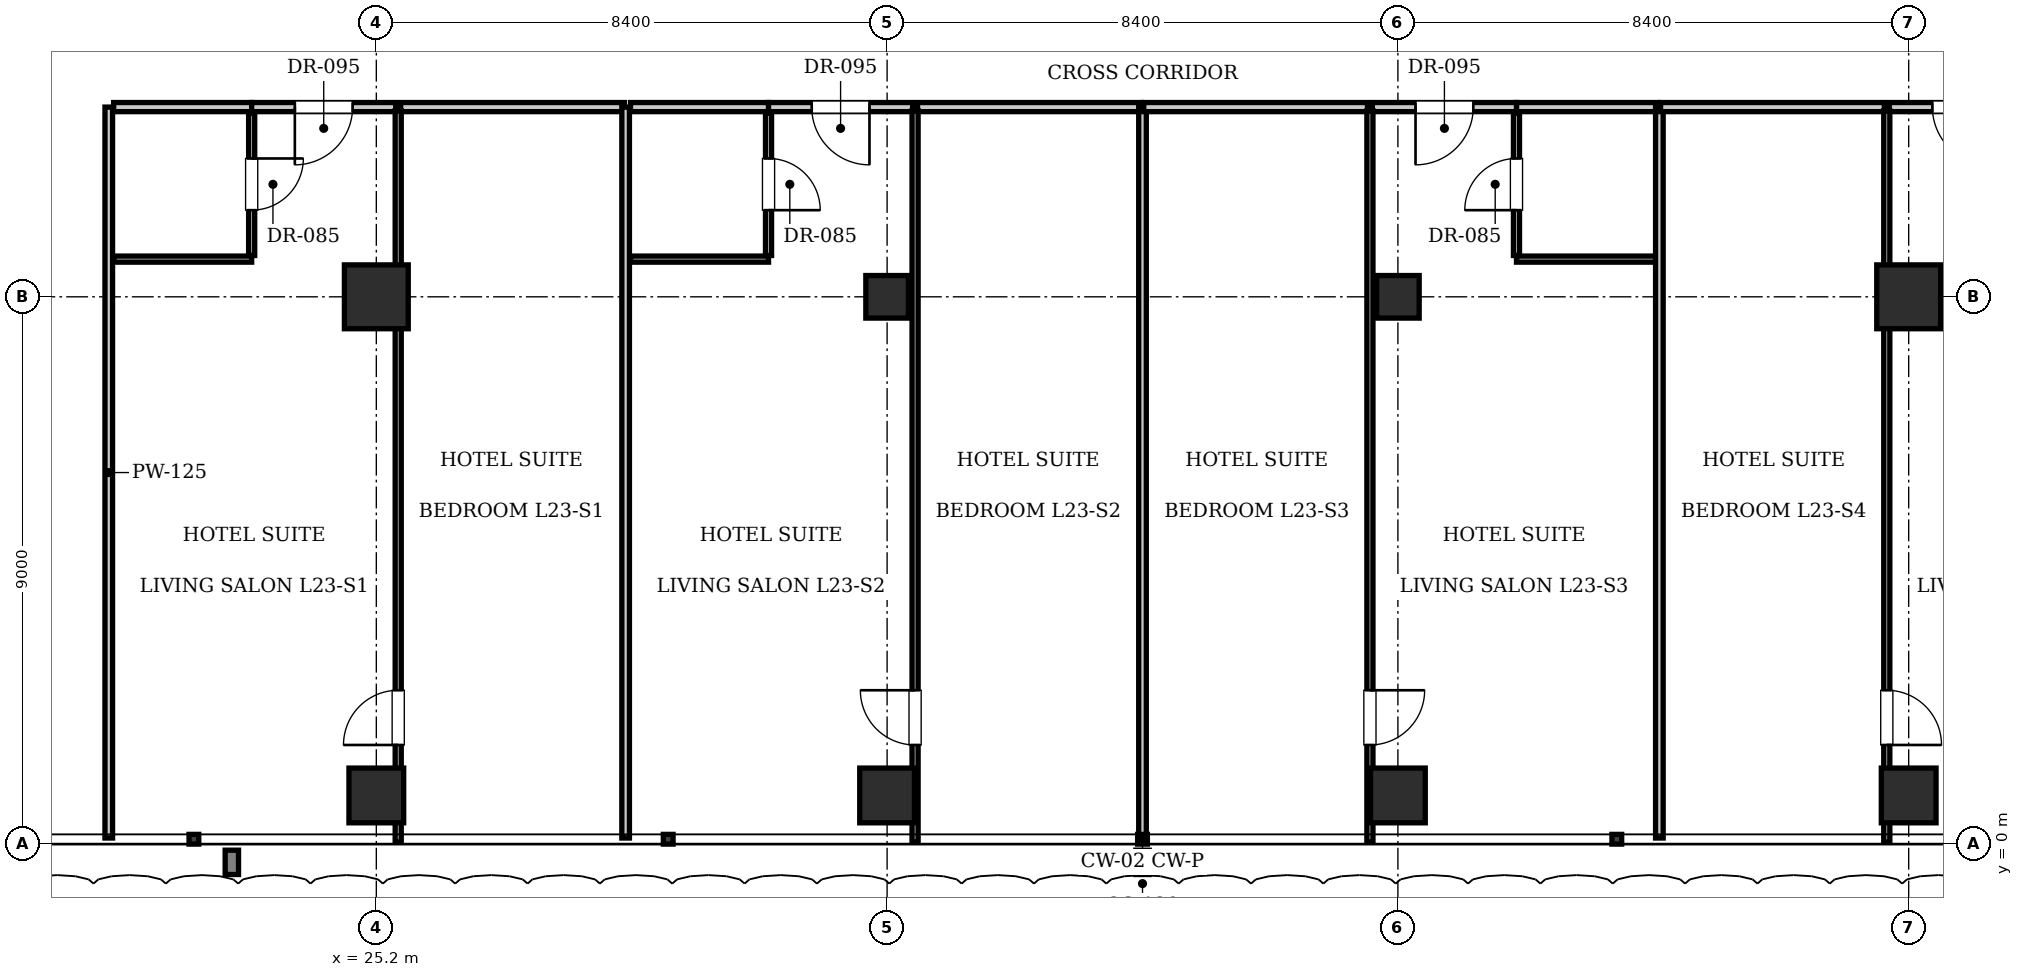
"""IFC4 building model, lengths in metres.
Left out: names, types, materials, properties, quantities, classifications, styles, units other than length and angle.
Written with IfcOpenShell. Run it as: python <this file> out.ifc"""

import sys

from ifc_helpers import new_model, si_unit, direction, frame, frame_2d, origin, origin_2d, place, context, subcontext, project, spatial, rectangle, i_section, extrude, element, fill, save


model = new_model("IFC4")
c1 = context("Model", 3, precision=1e-05, world=origin(), true_north=direction((0.0, 1.0)))
c2 = subcontext(c1, "Body", "Model", "MODEL_VIEW")
j1 = project(units=[si_unit("LENGTHUNIT", "METRE"), si_unit("PLANEANGLEUNIT", "RADIAN")], contexts=[c1])
p1 = place(None, origin())
s1 = spatial("IfcSite", under=j1, at=p1, CompositionType="ELEMENT")
p2 = place(p1, origin())
s2 = spatial("IfcBuilding", under=s1, at=p2, CompositionType="ELEMENT")
p3 = place(p2, frame((0.0, 0.0, 96.25)))
s3 = spatial("IfcBuildingStorey", under=s2, at=p3, CompositionType="ELEMENT", Elevation=96.25)
for number, where, z_axis, x_axis in (
    (1, (25.2, 9.0, 0.0), (0.0, 0.0, 1.0), (1.0, 0.0, 0.0)),
    (2, (50.4, 9.0, 0.0), (0.0, 0.0, 1.0), (1.0, 0.0, 0.0)),
):
    element("IfcColumn", number, at=place(p3, frame(where, z_axis=z_axis, x_axis=x_axis)), inside=s3, PredefinedType="COLUMN", context=c2, shape_type="SweptSolid", body=[
        extrude(rectangle(XDim=1.05, YDim=1.05, at=origin_2d()), origin(), (0.0, 0.0, 1.0), 3.85),
    ])
for number, where, z_axis, x_axis in (
    (3, (33.6, 9.0, 0.0), (0.0, 0.0, 1.0), (1.0, 0.0, 0.0)),
    (4, (42.0, 9.0, 0.0), (0.0, 0.0, 1.0), (1.0, 0.0, 0.0)),
):
    element("IfcColumn", number, at=place(p3, frame(where, z_axis=z_axis, x_axis=x_axis)), inside=s3, PredefinedType="COLUMN", context=c2, shape_type="SweptSolid", body=[
        extrude(i_section(OverallWidth=0.7, OverallDepth=0.7, WebThickness=0.028, FlangeThickness=0.044, at=origin_2d()), origin(), (0.0, 0.0, 1.0), 3.85),
    ])
for number, where, z_axis, x_axis in (
    (5, (25.2, 0.8, 0.0), (0.0, 0.0, 1.0), (1.0, 0.0, 0.0)),
    (6, (33.6, 0.8, 0.0), (0.0, 0.0, 1.0), (1.0, 0.0, 0.0)),
    (7, (42.0, 0.8, 0.0), (0.0, 0.0, 1.0), (1.0, 0.0, 0.0)),
    (8, (50.4, 0.8, 0.0), (0.0, 0.0, 1.0), (1.0, 0.0, 0.0)),
):
    element("IfcColumn", number, at=place(p3, frame(where, z_axis=z_axis, x_axis=x_axis)), inside=s3, PredefinedType="COLUMN", context=c2, shape_type="SweptSolid", body=[
        extrude(rectangle(XDim=0.9, YDim=0.9, at=origin_2d()), origin(), (0.0, 0.0, 1.0), 3.85),
    ])
p4 = place(p3, frame((20.8, 0.1, 0.0), z_axis=(0.0, 0.0, 1.0), x_axis=(0.0, 1.0, 0.0)))
e9 = element("IfcWall", 9, at=p4, inside=s3, PredefinedType="PARTITIONING", context=c2, shape_type="SweptSolid", body=[
    extrude(rectangle(XDim=12.02, YDim=0.125, at=frame_2d((6.01, 0.0))), origin(), (0.0, 0.0, 1.0), 3.61),
])
p5 = place(p3, frame((20.88, 12.12, 0.0), z_axis=(0.0, 0.0, 1.0), x_axis=(1.0, 0.0, 0.0)))
e10 = element("IfcWall", 10, at=p5, inside=s3, PredefinedType="PARTITIONING", context=c2, shape_type="SweptSolid", body=[
    extrude(rectangle(XDim=2.27, YDim=0.15, at=frame_2d((1.135, 0.0))), origin(), (0.0, 0.0, 1.0), 3.61),
])
p6 = place(p3, frame((20.88, 9.62, 0.0), z_axis=(0.0, 0.0, 1.0), x_axis=(1.0, 0.0, 0.0)))
e11 = element("IfcWall", 11, at=p6, inside=s3, PredefinedType="PARTITIONING", context=c2, shape_type="SweptSolid", body=[
    extrude(rectangle(XDim=2.27, YDim=0.1, at=frame_2d((1.135, 0.0))), origin(), (0.0, 0.0, 1.0), 3.61),
])
p7 = place(p3, frame((23.15, 9.68, 0.0), z_axis=(0.0, 0.0, 1.0), x_axis=(0.0, 1.0, 0.0)))
e12 = element("IfcWall", 12, at=p7, inside=s3, PredefinedType="PARTITIONING", context=c2, shape_type="SweptSolid", body=[
    extrude(rectangle(XDim=2.34, YDim=0.1, at=frame_2d((1.17, 0.0))), origin(), (0.0, 0.0, 1.0), 3.61),
])
p8 = place(p7, frame((0.745, 0.0, 0.0)))
e13 = element("IfcOpeningElement", 13, at=p8, cuts=e12, PredefinedType="OPENING", context=c2, shape_type="SweptSolid", body=[
    extrude(rectangle(XDim=0.85, YDim=2.1, at=frame_2d((0.425, 1.05))), frame((0.0, 0.06, 0.0), z_axis=(0.0, -1.0, 0.0), x_axis=(1.0, 0.0, 0.0)), (0.0, 0.0, 1.0), 0.12),
])
p9 = place(p3, frame((23.15, 12.12, 0.0), z_axis=(0.0, 0.0, 1.0), x_axis=(1.0, 0.0, 0.0)))
e14 = element("IfcWall", 14, at=p9, inside=s3, PredefinedType="PARTITIONING", context=c2, shape_type="SweptSolid", body=[
    extrude(rectangle(XDim=2.37, YDim=0.15, at=frame_2d((1.185, 0.0))), origin(), (0.0, 0.0, 1.0), 3.61),
])
p10 = place(p9, frame((0.71, 0.0, 0.0)))
e15 = element("IfcOpeningElement", 15, at=p10, cuts=e14, PredefinedType="OPENING", context=c2, shape_type="SweptSolid", body=[
    extrude(rectangle(XDim=0.95, YDim=2.15, at=frame_2d((0.475, 1.075))), frame((0.0, 0.085, 0.0), z_axis=(0.0, -1.0, 0.0), x_axis=(1.0, 0.0, 0.0)), (0.0, 0.0, 1.0), 0.17),
])
p11 = place(p3, frame((25.6, 12.12, 0.0), z_axis=(0.0, 0.0, 1.0), x_axis=(1.0, 0.0, 0.0)))
e16 = element("IfcWall", 16, at=p11, inside=s3, PredefinedType="PARTITIONING", context=c2, shape_type="SweptSolid", body=[
    extrude(rectangle(XDim=3.68, YDim=0.15, at=frame_2d((1.84, 0.0))), origin(), (0.0, 0.0, 1.0), 3.61),
])
p12 = place(p3, frame((25.56, 0.03, 0.0), z_axis=(0.0, 0.0, 1.0), x_axis=(0.0, 1.0, 0.0)))
e17 = element("IfcWall", 17, at=p12, inside=s3, PredefinedType="PARTITIONING", context=c2, shape_type="SweptSolid", body=[
    extrude(rectangle(XDim=12.03, YDim=0.1, at=frame_2d((6.015, 0.0))), origin(), (0.0, 0.0, 1.0), 3.61),
])
p13 = place(p12, frame((1.6, 0.0, 0.0)))
e18 = element("IfcOpeningElement", 18, at=p13, cuts=e17, PredefinedType="OPENING", context=c2, shape_type="SweptSolid", body=[
    extrude(rectangle(XDim=0.9, YDim=2.1, at=frame_2d((0.45, 1.05))), frame((0.0, 0.06, 0.0), z_axis=(0.0, -1.0, 0.0), x_axis=(1.0, 0.0, 0.0)), (0.0, 0.0, 1.0), 0.12),
])
p14 = place(p3, frame((29.3, 0.1, 0.0), z_axis=(0.0, 0.0, 1.0), x_axis=(0.0, 1.0, 0.0)))
e19 = element("IfcWall", 19, at=p14, inside=s3, PredefinedType="PARTITIONING", context=c2, shape_type="SweptSolid", body=[
    extrude(rectangle(XDim=12.02, YDim=0.125, at=frame_2d((6.01, 0.0))), origin(), (0.0, 0.0, 1.0), 3.293),
])
p15 = place(p3, frame((29.38, 12.12, 0.0), z_axis=(0.0, 0.0, 1.0), x_axis=(1.0, 0.0, 0.0)))
e20 = element("IfcWall", 20, at=p15, inside=s3, PredefinedType="PARTITIONING", context=c2, shape_type="SweptSolid", body=[
    extrude(rectangle(XDim=2.27, YDim=0.15, at=frame_2d((1.135, 0.0))), origin(), (0.0, 0.0, 1.0), 3.61),
])
p16 = place(p3, frame((29.38, 9.62, 0.0), z_axis=(0.0, 0.0, 1.0), x_axis=(1.0, 0.0, 0.0)))
e21 = element("IfcWall", 21, at=p16, inside=s3, PredefinedType="PARTITIONING", context=c2, shape_type="SweptSolid", body=[
    extrude(rectangle(XDim=2.27, YDim=0.1, at=frame_2d((1.135, 0.0))), origin(), (0.0, 0.0, 1.0), 3.61),
])
p17 = place(p3, frame((31.65, 9.68, 0.0), z_axis=(0.0, 0.0, 1.0), x_axis=(0.0, 1.0, 0.0)))
e22 = element("IfcWall", 22, at=p17, inside=s3, PredefinedType="PARTITIONING", context=c2, shape_type="SweptSolid", body=[
    extrude(rectangle(XDim=2.34, YDim=0.1, at=frame_2d((1.17, 0.0))), origin(), (0.0, 0.0, 1.0), 3.61),
])
p18 = place(p17, frame((0.745, 0.0, 0.0)))
e23 = element("IfcOpeningElement", 23, at=p18, cuts=e22, PredefinedType="OPENING", context=c2, shape_type="SweptSolid", body=[
    extrude(rectangle(XDim=0.85, YDim=2.1, at=frame_2d((0.425, 1.05))), frame((0.0, 0.06, 0.0), z_axis=(0.0, -1.0, 0.0), x_axis=(1.0, 0.0, 0.0)), (0.0, 0.0, 1.0), 0.12),
])
p19 = place(p3, frame((31.65, 12.12, 0.0), z_axis=(0.0, 0.0, 1.0), x_axis=(1.0, 0.0, 0.0)))
e24 = element("IfcWall", 24, at=p19, inside=s3, PredefinedType="PARTITIONING", context=c2, shape_type="SweptSolid", body=[
    extrude(rectangle(XDim=2.37, YDim=0.15, at=frame_2d((1.185, 0.0))), origin(), (0.0, 0.0, 1.0), 3.61),
])
p20 = place(p19, frame((0.71, 0.0, 0.0)))
e25 = element("IfcOpeningElement", 25, at=p20, cuts=e24, PredefinedType="OPENING", context=c2, shape_type="SweptSolid", body=[
    extrude(rectangle(XDim=0.95, YDim=2.15, at=frame_2d((0.475, 1.075))), frame((0.0, 0.085, 0.0), z_axis=(0.0, -1.0, 0.0), x_axis=(1.0, 0.0, 0.0)), (0.0, 0.0, 1.0), 0.17),
])
p21 = place(p3, frame((34.1, 12.12, 0.0), z_axis=(0.0, 0.0, 1.0), x_axis=(1.0, 0.0, 0.0)))
e26 = element("IfcWall", 26, at=p21, inside=s3, PredefinedType="PARTITIONING", context=c2, shape_type="SweptSolid", body=[
    extrude(rectangle(XDim=3.68, YDim=0.15, at=frame_2d((1.84, 0.0))), origin(), (0.0, 0.0, 1.0), 3.61),
])
p22 = place(p3, frame((34.06, 0.03, 0.0), z_axis=(0.0, 0.0, 1.0), x_axis=(0.0, 1.0, 0.0)))
e27 = element("IfcWall", 27, at=p22, inside=s3, PredefinedType="PARTITIONING", context=c2, shape_type="SweptSolid", body=[
    extrude(rectangle(XDim=12.03, YDim=0.1, at=frame_2d((6.015, 0.0))), origin(), (0.0, 0.0, 1.0), 3.61),
])
p23 = place(p22, frame((1.6, 0.0, 0.0)))
e28 = element("IfcOpeningElement", 28, at=p23, cuts=e27, PredefinedType="OPENING", context=c2, shape_type="SweptSolid", body=[
    extrude(rectangle(XDim=0.9, YDim=2.1, at=frame_2d((0.45, 1.05))), frame((0.0, 0.06, 0.0), z_axis=(0.0, -1.0, 0.0), x_axis=(1.0, 0.0, 0.0)), (0.0, 0.0, 1.0), 0.12),
])
p24 = place(p3, frame((37.8, 0.1, 0.0), z_axis=(0.0, 0.0, 1.0), x_axis=(0.0, 1.0, 0.0)))
e29 = element("IfcWall", 29, at=p24, inside=s3, PredefinedType="PARTITIONING", context=c2, shape_type="SweptSolid", body=[
    extrude(rectangle(XDim=12.02, YDim=0.125, at=frame_2d((6.01, 0.0))), origin(), (0.0, 0.0, 1.0), 3.344),
])
p25 = place(p3, frame((43.95, 12.12, 0.0), z_axis=(0.0, 0.0, 1.0), x_axis=(1.0, 0.0, 0.0)))
e30 = element("IfcWall", 30, at=p25, inside=s3, PredefinedType="PARTITIONING", context=c2, shape_type="SweptSolid", body=[
    extrude(rectangle(XDim=2.33, YDim=0.15, at=frame_2d((1.165, 0.0))), origin(), (0.0, 0.0, 1.0), 3.61),
])
p26 = place(p3, frame((43.95, 9.62, 0.0), z_axis=(0.0, 0.0, 1.0), x_axis=(1.0, 0.0, 0.0)))
e31 = element("IfcWall", 31, at=p26, inside=s3, PredefinedType="PARTITIONING", context=c2, shape_type="SweptSolid", body=[
    extrude(rectangle(XDim=2.31, YDim=0.1, at=frame_2d((1.155, 0.0))), origin(), (0.0, 0.0, 1.0), 3.61),
])
p27 = place(p3, frame((43.95, 9.68, 0.0), z_axis=(0.0, 0.0, 1.0), x_axis=(0.0, 1.0, 0.0)))
e32 = element("IfcWall", 32, at=p27, inside=s3, PredefinedType="PARTITIONING", context=c2, shape_type="SweptSolid", body=[
    extrude(rectangle(XDim=2.34, YDim=0.1, at=frame_2d((1.17, 0.0))), origin(), (0.0, 0.0, 1.0), 3.61),
])
p28 = place(p27, frame((0.745, 0.0, 0.0)))
e33 = element("IfcOpeningElement", 33, at=p28, cuts=e32, PredefinedType="OPENING", context=c2, shape_type="SweptSolid", body=[
    extrude(rectangle(XDim=0.85, YDim=2.1, at=frame_2d((0.425, 1.05))), frame((0.0, 0.06, 0.0), z_axis=(0.0, -1.0, 0.0), x_axis=(1.0, 0.0, 0.0)), (0.0, 0.0, 1.0), 0.12),
])
p29 = place(p3, frame((37.82, 12.12, 0.0), z_axis=(0.0, 0.0, 1.0), x_axis=(1.0, 0.0, 0.0)))
e34 = element("IfcWall", 34, at=p29, inside=s3, PredefinedType="PARTITIONING", context=c2, shape_type="SweptSolid", body=[
    extrude(rectangle(XDim=3.68, YDim=0.15, at=frame_2d((1.84, 0.0))), origin(), (0.0, 0.0, 1.0), 3.61),
])
p30 = place(p3, frame((41.58, 12.12, 0.0), z_axis=(0.0, 0.0, 1.0), x_axis=(1.0, 0.0, 0.0)))
e35 = element("IfcWall", 35, at=p30, inside=s3, PredefinedType="PARTITIONING", context=c2, shape_type="SweptSolid", body=[
    extrude(rectangle(XDim=2.37, YDim=0.15, at=frame_2d((1.185, 0.0))), origin(), (0.0, 0.0, 1.0), 3.61),
])
p31 = place(p30, frame((0.71, 0.0, 0.0)))
e36 = element("IfcOpeningElement", 36, at=p31, cuts=e35, PredefinedType="OPENING", context=c2, shape_type="SweptSolid", body=[
    extrude(rectangle(XDim=0.95, YDim=2.15, at=frame_2d((0.475, 1.075))), frame((0.0, 0.085, 0.0), z_axis=(0.0, -1.0, 0.0), x_axis=(1.0, 0.0, 0.0)), (0.0, 0.0, 1.0), 0.17),
])
p32 = place(p3, frame((41.54, 0.03, 0.0), z_axis=(0.0, 0.0, 1.0), x_axis=(0.0, 1.0, 0.0)))
e37 = element("IfcWall", 37, at=p32, inside=s3, PredefinedType="PARTITIONING", context=c2, shape_type="SweptSolid", body=[
    extrude(rectangle(XDim=12.03, YDim=0.1, at=frame_2d((6.015, 0.0))), origin(), (0.0, 0.0, 1.0), 3.61),
])
p33 = place(p32, frame((1.6, 0.0, 0.0)))
e38 = element("IfcOpeningElement", 38, at=p33, cuts=e37, PredefinedType="OPENING", context=c2, shape_type="SweptSolid", body=[
    extrude(rectangle(XDim=0.9, YDim=2.1, at=frame_2d((0.45, 1.05))), frame((0.0, 0.06, 0.0), z_axis=(0.0, -1.0, 0.0), x_axis=(1.0, 0.0, 0.0)), (0.0, 0.0, 1.0), 0.12),
])
p34 = place(p3, frame((46.3, 0.1, 0.0), z_axis=(0.0, 0.0, 1.0), x_axis=(0.0, 1.0, 0.0)))
e39 = element("IfcWall", 39, at=p34, inside=s3, PredefinedType="PARTITIONING", context=c2, shape_type="SweptSolid", body=[
    extrude(rectangle(XDim=12.02, YDim=0.125, at=frame_2d((6.01, 0.0))), origin(), (0.0, 0.0, 1.0), 3.403),
])
p35 = place(p3, frame((46.32, 12.12, 0.0), z_axis=(0.0, 0.0, 1.0), x_axis=(1.0, 0.0, 0.0)))
e40 = element("IfcWall", 40, at=p35, inside=s3, PredefinedType="PARTITIONING", context=c2, shape_type="SweptSolid", body=[
    extrude(rectangle(XDim=3.68, YDim=0.15, at=frame_2d((1.84, 0.0))), origin(), (0.0, 0.0, 1.0), 3.61),
])
p36 = place(p3, frame((50.08, 12.12, 0.0), z_axis=(0.0, 0.0, 1.0), x_axis=(1.0, 0.0, 0.0)))
e41 = element("IfcWall", 41, at=p36, inside=s3, PredefinedType="PARTITIONING", context=c2, shape_type="SweptSolid", body=[
    extrude(rectangle(XDim=2.37, YDim=0.15, at=frame_2d((1.185, 0.0))), origin(), (0.0, 0.0, 1.0), 3.61),
])
p37 = place(p36, frame((0.71, 0.0, 0.0)))
e42 = element("IfcOpeningElement", 42, at=p37, cuts=e41, PredefinedType="OPENING", context=c2, shape_type="SweptSolid", body=[
    extrude(rectangle(XDim=0.95, YDim=2.15, at=frame_2d((0.475, 1.075))), frame((0.0, 0.085, 0.0), z_axis=(0.0, -1.0, 0.0), x_axis=(1.0, 0.0, 0.0)), (0.0, 0.0, 1.0), 0.17),
])
p38 = place(p3, frame((50.04, 0.03, 0.0), z_axis=(0.0, 0.0, 1.0), x_axis=(0.0, 1.0, 0.0)))
e43 = element("IfcWall", 43, at=p38, inside=s3, PredefinedType="PARTITIONING", context=c2, shape_type="SweptSolid", body=[
    extrude(rectangle(XDim=12.03, YDim=0.1, at=frame_2d((6.015, 0.0))), origin(), (0.0, 0.0, 1.0), 3.61),
])
p39 = place(p38, frame((1.6, 0.0, 0.0)))
e44 = element("IfcOpeningElement", 44, at=p39, cuts=e43, PredefinedType="OPENING", context=c2, shape_type="SweptSolid", body=[
    extrude(rectangle(XDim=0.9, YDim=2.1, at=frame_2d((0.45, 1.05))), frame((0.0, 0.06, 0.0), z_axis=(0.0, -1.0, 0.0), x_axis=(1.0, 0.0, 0.0)), (0.0, 0.0, 1.0), 0.12),
])
p40 = place(p8, frame((0.85, 0.0, 0.0), z_axis=(0.0, 0.0, 1.0), x_axis=(-1.0, 0.0, 0.0)))
e45 = element("IfcDoor", 45, at=p40, inside=s3, OperationType="SINGLE_SWING_LEFT", PredefinedType="DOOR", context=c2, shape_type="SweptSolid", body=[
    extrude(rectangle(XDim=0.85, YDim=2.1, at=frame_2d((0.425, 1.05))), frame((0.0, 0.025, 0.0), z_axis=(0.0, -1.0, 0.0), x_axis=(1.0, 0.0, 0.0)), (0.0, 0.0, 1.0), 0.05),
])
fill(e13, e45)
p41 = place(p10, frame((0.95, 0.0, 0.0), z_axis=(0.0, 0.0, 1.0), x_axis=(-1.0, 0.0, 0.0)))
e46 = element("IfcDoor", 46, at=p41, inside=s3, OperationType="SINGLE_SWING_RIGHT", PredefinedType="DOOR", context=c2, shape_type="SweptSolid", body=[
    extrude(rectangle(XDim=0.95, YDim=2.15, at=frame_2d((0.475, 1.075))), frame((0.0, 0.025, 0.0), z_axis=(0.0, -1.0, 0.0), x_axis=(1.0, 0.0, 0.0)), (0.0, 0.0, 1.0), 0.05),
])
fill(e15, e46)
p42 = place(p13, origin())
e47 = element("IfcDoor", 47, at=p42, inside=s3, OperationType="SINGLE_SWING_LEFT", PredefinedType="DOOR", context=c2, shape_type="SweptSolid", body=[
    extrude(rectangle(XDim=0.9, YDim=2.1, at=frame_2d((0.45, 1.05))), frame((0.0, 0.025, 0.0), z_axis=(0.0, -1.0, 0.0), x_axis=(1.0, 0.0, 0.0)), (0.0, 0.0, 1.0), 0.05),
])
fill(e18, e47)
p43 = place(p18, frame((0.85, 0.0, 0.0), z_axis=(0.0, 0.0, 1.0), x_axis=(-1.0, 0.0, 0.0)))
e48 = element("IfcDoor", 48, at=p43, inside=s3, OperationType="SINGLE_SWING_RIGHT", PredefinedType="DOOR", context=c2, shape_type="SweptSolid", body=[
    extrude(rectangle(XDim=0.85, YDim=2.1, at=frame_2d((0.425, 1.05))), frame((0.0, 0.025, 0.0), z_axis=(0.0, -1.0, 0.0), x_axis=(1.0, 0.0, 0.0)), (0.0, 0.0, 1.0), 0.05),
])
fill(e23, e48)
p44 = place(p20, frame((0.95, 0.0, 0.0), z_axis=(0.0, 0.0, 1.0), x_axis=(-1.0, 0.0, 0.0)))
e49 = element("IfcDoor", 49, at=p44, inside=s3, OperationType="SINGLE_SWING_LEFT", PredefinedType="DOOR", context=c2, shape_type="SweptSolid", body=[
    extrude(rectangle(XDim=0.95, YDim=2.15, at=frame_2d((0.475, 1.075))), frame((0.0, 0.025, 0.0), z_axis=(0.0, -1.0, 0.0), x_axis=(1.0, 0.0, 0.0)), (0.0, 0.0, 1.0), 0.05),
])
fill(e25, e49)
p45 = place(p23, origin())
e50 = element("IfcDoor", 50, at=p45, inside=s3, OperationType="SINGLE_SWING_RIGHT", PredefinedType="DOOR", context=c2, shape_type="SweptSolid", body=[
    extrude(rectangle(XDim=0.9, YDim=2.1, at=frame_2d((0.45, 1.05))), frame((0.0, 0.025, 0.0), z_axis=(0.0, -1.0, 0.0), x_axis=(1.0, 0.0, 0.0)), (0.0, 0.0, 1.0), 0.05),
])
fill(e28, e50)
p46 = place(p28, origin())
e51 = element("IfcDoor", 51, at=p46, inside=s3, OperationType="SINGLE_SWING_LEFT", PredefinedType="DOOR", context=c2, shape_type="SweptSolid", body=[
    extrude(rectangle(XDim=0.85, YDim=2.1, at=frame_2d((0.425, 1.05))), frame((0.0, 0.025, 0.0), z_axis=(0.0, -1.0, 0.0), x_axis=(1.0, 0.0, 0.0)), (0.0, 0.0, 1.0), 0.05),
])
fill(e33, e51)
p47 = place(p31, frame((0.95, 0.0, 0.0), z_axis=(0.0, 0.0, 1.0), x_axis=(-1.0, 0.0, 0.0)))
e52 = element("IfcDoor", 52, at=p47, inside=s3, OperationType="SINGLE_SWING_RIGHT", PredefinedType="DOOR", context=c2, shape_type="SweptSolid", body=[
    extrude(rectangle(XDim=0.95, YDim=2.15, at=frame_2d((0.475, 1.075))), frame((0.0, 0.025, 0.0), z_axis=(0.0, -1.0, 0.0), x_axis=(1.0, 0.0, 0.0)), (0.0, 0.0, 1.0), 0.05),
])
fill(e36, e52)
p48 = place(p33, frame((0.9, 0.0, 0.0), z_axis=(0.0, 0.0, 1.0), x_axis=(-1.0, 0.0, 0.0)))
e53 = element("IfcDoor", 53, at=p48, inside=s3, OperationType="SINGLE_SWING_LEFT", PredefinedType="DOOR", context=c2, shape_type="SweptSolid", body=[
    extrude(rectangle(XDim=0.9, YDim=2.1, at=frame_2d((0.45, 1.05))), frame((0.0, 0.025, 0.0), z_axis=(0.0, -1.0, 0.0), x_axis=(1.0, 0.0, 0.0)), (0.0, 0.0, 1.0), 0.05),
])
fill(e38, e53)
p49 = place(p37, frame((0.95, 0.0, 0.0), z_axis=(0.0, 0.0, 1.0), x_axis=(-1.0, 0.0, 0.0)))
e54 = element("IfcDoor", 54, at=p49, inside=s3, OperationType="SINGLE_SWING_LEFT", PredefinedType="DOOR", context=c2, shape_type="SweptSolid", body=[
    extrude(rectangle(XDim=0.95, YDim=2.15, at=frame_2d((0.475, 1.075))), frame((0.0, 0.025, 0.0), z_axis=(0.0, -1.0, 0.0), x_axis=(1.0, 0.0, 0.0)), (0.0, 0.0, 1.0), 0.05),
])
fill(e42, e54)
p50 = place(p39, frame((0.9, 0.0, 0.0), z_axis=(0.0, 0.0, 1.0), x_axis=(-1.0, 0.0, 0.0)))
e55 = element("IfcDoor", 55, at=p50, inside=s3, OperationType="SINGLE_SWING_RIGHT", PredefinedType="DOOR", context=c2, shape_type="SweptSolid", body=[
    extrude(rectangle(XDim=0.9, YDim=2.1, at=frame_2d((0.45, 1.05))), frame((0.0, 0.025, 0.0), z_axis=(0.0, -1.0, 0.0), x_axis=(1.0, 0.0, 0.0)), (0.0, 0.0, 1.0), 0.05),
])
fill(e44, e55)
save(model, sys.argv[1])
